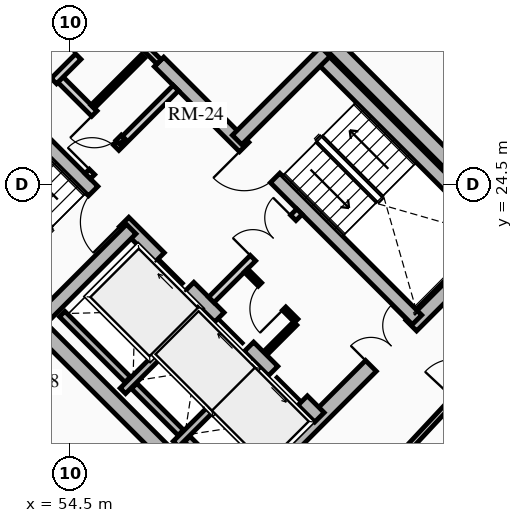
"""IFC4 building model, lengths in metres.
Left out: names, types, materials, properties, quantities, classifications, styles, units other than length and angle.
Written with IfcOpenShell. Run it as: python <this file> out.ifc"""

import sys

from ifc_helpers import new_model, si_unit, direction, frame, frame_2d, origin, place, context, subcontext, project, spatial, rectangle, extrude, source, transform, mapped, element, fill, save


model = new_model("IFC4")
c1 = context("Model", 3, precision=1e-05, world=origin(), true_north=direction((0.0, 1.0)))
c2 = subcontext(c1, "Body", "Model", "MODEL_VIEW")
j1 = project(units=[si_unit("LENGTHUNIT", "METRE"), si_unit("PLANEANGLEUNIT", "RADIAN")], contexts=[c1])
p1 = place(None, origin())
s1 = spatial("IfcSite", under=j1, at=p1, CompositionType="ELEMENT")
p2 = place(p1, origin())
s2 = spatial("IfcBuilding", under=s1, at=p2, CompositionType="ELEMENT")
p3 = place(p2, frame((0.0, 0.0, 171.97)))
s3 = spatial("IfcBuildingStorey", under=s2, at=p3, CompositionType="ELEMENT", Elevation=171.97)
for number, where, z_axis, x_axis in (
    (1, (58.702, 15.732, 0.0), (0.0, 0.0, 1.0), (-0.707, 0.707, 0.0)),
    (2, (66.268, 23.298, 0.0), (0.0, 0.0, 1.0), (-0.707, 0.707, 0.0)),
):
    element("IfcWall", number, at=place(p3, frame(where, z_axis=z_axis, x_axis=x_axis)), inside=s3, PredefinedType="SHEAR", context=c2, shape_type="SweptSolid", body=[
        extrude(rectangle(XDim=14.1, YDim=0.4, at=frame_2d((7.05, 0.0))), origin(), (0.0, 0.0, 1.0), 2.91),
    ])
p4 = place(p3, frame((58.561, 15.873, 0.0), z_axis=(0.0, 0.0, 1.0), x_axis=(0.707106781187, 0.707106781187, 0.0)))
e3 = element("IfcWall", 3, at=p4, inside=s3, PredefinedType="SHEAR", context=c2, shape_type="SweptSolid", body=[
    extrude(rectangle(XDim=10.7, YDim=0.4, at=frame_2d((5.35, 0.0))), origin(), (0.0, 0.0, 1.0), 2.91),
])
m1 = source(origin(), c2, "Body", "SweptSolid", [
    extrude(rectangle(XDim=1.5, YDim=2.02, at=frame_2d((0.75, 1.01))), frame((0.0, 0.21, 0.0), z_axis=(0.0, -1.0, 0.0), x_axis=(1.0, 0.0, 0.0)), (0.0, 0.0, 1.0), 0.42),
])
p5 = place(p4, frame((5.45, 0.0, 0.0)))
e4 = element("IfcOpeningElement", 4, at=p5, cuts=e3, PredefinedType="OPENING", context=c2, shape_type="MappedRepresentation", body=[
    mapped(m1, transform((0.0, 0.0, 0.0), x_axis=(1.0, 0.0, 0.0), y_axis=(0.0, 1.0, 0.0), z_axis=(0.0, 0.0, 1.0), scale=1.0)),
])
p6 = place(p3, frame((48.873, 25.561, 0.0), z_axis=(0.0, 0.0, 1.0), x_axis=(0.707106781187, 0.707106781187, 0.0)))
e5 = element("IfcWall", 5, at=p6, inside=s3, PredefinedType="SHEAR", context=c2, shape_type="SweptSolid", body=[
    extrude(rectangle(XDim=10.7, YDim=0.4, at=frame_2d((5.35, 0.0))), origin(), (0.0, 0.0, 1.0), 2.91),
])
p7 = place(p6, frame((4.6, 0.0, 0.0)))
e6 = element("IfcOpeningElement", 6, at=p7, cuts=e5, PredefinedType="OPENING", context=c2, shape_type="MappedRepresentation", body=[
    mapped(m1, transform((0.0, 0.0, 0.0), x_axis=(1.0, 0.0, 0.0), y_axis=(0.0, 1.0, 0.0), z_axis=(0.0, 0.0, 1.0), scale=1.0)),
])
p8 = place(p3, frame((61.06, 18.373, 0.0), z_axis=(0.0, 0.0, 1.0), x_axis=(-0.707106781187, 0.707106781187, 0.0)))
e7 = element("IfcWall", 7, at=p8, inside=s3, PredefinedType="SHEAR", context=c2, shape_type="SweptSolid", body=[
    extrude(rectangle(XDim=13.7, YDim=0.35, at=frame_2d((6.85, 0.0))), origin(), (0.0, 0.0, 1.0), 2.91),
])
m2 = source(origin(), c2, "Body", "SweptSolid", [
    extrude(rectangle(XDim=1.1, YDim=2.015, at=frame_2d((0.55, 1.007))), frame((0.0, 0.185, 0.0), z_axis=(0.0, -1.0, 0.0), x_axis=(1.0, 0.0, 0.0)), (0.0, 0.0, 1.0), 0.37),
])
p9 = place(p8, frame((4.85, 0.0, 0.0)))
e8 = element("IfcOpeningElement", 8, at=p9, cuts=e7, PredefinedType="OPENING", context=c2, shape_type="MappedRepresentation", body=[
    mapped(m2, transform((0.0, 0.0, 0.0), x_axis=(1.0, 0.0, 0.0), y_axis=(0.0, 1.0, 0.0), z_axis=(0.0, 0.0, 1.0), scale=1.0)),
])
p10 = place(p8, frame((0.625, 0.0, 0.0)))
e9 = element("IfcOpeningElement", 9, at=p10, cuts=e7, PredefinedType="OPENING", context=c2, shape_type="MappedRepresentation", body=[
    mapped(m2, transform((0.0, 0.0, 0.0), x_axis=(1.0, 0.0, 0.0), y_axis=(0.0, 1.0, 0.0), z_axis=(0.0, 0.0, 1.0), scale=1.0)),
])
p11 = place(p8, frame((2.625, 0.0, 0.0)))
e10 = element("IfcOpeningElement", 10, at=p11, cuts=e7, PredefinedType="OPENING", context=c2, shape_type="MappedRepresentation", body=[
    mapped(m2, transform((0.0, 0.0, 0.0), x_axis=(1.0, 0.0, 0.0), y_axis=(0.0, 1.0, 0.0), z_axis=(0.0, 0.0, 1.0), scale=1.0)),
])
m3 = source(origin(), c2, "Body", "SweptSolid", [
    extrude(rectangle(XDim=1.15, YDim=2.02, at=frame_2d((0.575, 1.01))), frame((0.0, 0.185, 0.0), z_axis=(0.0, -1.0, 0.0), x_axis=(1.0, 0.0, 0.0)), (0.0, 0.0, 1.0), 0.37),
])
p12 = place(p8, frame((7.27, 0.0, 0.0)))
e11 = element("IfcOpeningElement", 11, at=p12, cuts=e7, PredefinedType="OPENING", context=c2, shape_type="MappedRepresentation", body=[
    mapped(m3, transform((0.0, 0.0, 0.0), x_axis=(1.0, 0.0, 0.0), y_axis=(0.0, 1.0, 0.0), z_axis=(0.0, 0.0, 1.0), scale=1.0)),
])
p13 = place(p3, frame((63.627, 20.94, 0.0), z_axis=(0.0, 0.0, 1.0), x_axis=(-0.707119496762, 0.707094065383, 0.0)))
e12 = element("IfcWall", 12, at=p13, inside=s3, PredefinedType="SHEAR", context=c2, shape_type="SweptSolid", body=[
    extrude(rectangle(XDim=9.6, YDim=0.35, at=frame_2d((4.8, 0.0))), origin(), (0.0, 0.0, 1.0), 2.91),
])
p14 = place(p13, frame((5.28, 0.0, 0.0)))
e13 = element("IfcOpeningElement", 13, at=p14, cuts=e12, PredefinedType="OPENING", context=c2, shape_type="MappedRepresentation", body=[
    mapped(m3, transform((0.0, 0.0, 0.0), x_axis=(1.0, 0.0, 0.0), y_axis=(0.0, 1.0, 0.0), z_axis=(0.0, 0.0, 1.0), scale=1.0)),
])
p15 = place(p3, frame((53.922, 21.141, 0.0), z_axis=(0.0, 0.0, 1.0), x_axis=(-0.707106781187, 0.707106781187, 0.0)))
e14 = element("IfcWall", 14, at=p15, inside=s3, PredefinedType="SHEAR", context=c2, shape_type="SweptSolid", body=[
    extrude(rectangle(XDim=6.695, YDim=0.35, at=frame_2d((3.348, 0.0))), origin(), (0.0, 0.0, 1.0), 2.91),
])
p16 = place(p3, frame((53.784, 21.003, 0.0), z_axis=(0.0, 0.0, 1.0), x_axis=(0.707106781187, 0.707106781187, 0.0)))
e15 = element("IfcWall", 15, at=p16, inside=s3, PredefinedType="SHEAR", context=c2, shape_type="SweptSolid", body=[
    extrude(rectangle(XDim=3.285, YDim=0.35, at=frame_2d((1.643, 0.0))), origin(), (0.0, 0.0, 1.0), 2.91),
])
p17 = place(p3, frame((65.812, 23.125, 0.0), z_axis=(0.0, 0.0, 1.0), x_axis=(-0.707106781187, 0.707106781187, 0.0)))
e16 = element("IfcWall", 16, at=p17, inside=s3, PredefinedType="SHEAR", context=c2, shape_type="SweptSolid", body=[
    extrude(rectangle(XDim=6.695, YDim=0.35, at=frame_2d((3.348, 0.0))), origin(), (0.0, 0.0, 1.0), 2.91),
])
p18 = place(p3, frame((58.893, 25.674, 0.0), z_axis=(0.0, 0.0, 1.0), x_axis=(0.707106781187, 0.707106781187, 0.0)))
e17 = element("IfcWall", 17, at=p18, inside=s3, PredefinedType="SHEAR", context=c2, shape_type="SweptSolid", body=[
    extrude(rectangle(XDim=3.285, YDim=0.35, at=frame_2d((1.643, 0.0))), origin(), (0.0, 0.0, 1.0), 2.91),
])
p19 = place(p3, frame((55.888, 19.069, 0.0), z_axis=(0.0, 0.0, 1.0), x_axis=(0.707106781187, 0.707106781187, 0.0)))
e18 = element("IfcWall", 18, at=p19, inside=s3, PredefinedType="SHEAR", context=c2, shape_type="SweptSolid", body=[
    extrude(rectangle(XDim=2.97, YDim=0.2, at=frame_2d((1.485, 0.0))), origin(), (0.0, 0.0, 1.0), 2.91),
])
p20 = place(p3, frame((56.015, 19.366, 0.0), z_axis=(0.0, 0.0, 1.0), x_axis=(-0.707106781187, 0.707106781187, 0.0)))
e19 = element("IfcWall", 19, at=p20, inside=s3, PredefinedType="SHEAR", context=c2, shape_type="SweptSolid", body=[
    extrude(rectangle(XDim=2.44, YDim=0.2, at=frame_2d((1.22, 0.0))), origin(), (0.0, 0.0, 1.0), 2.91),
])
p21 = place(p3, frame((57.284, 17.673, 0.0), z_axis=(0.0, 0.0, 1.0), x_axis=(0.707147878904, 0.70706568108, 0.0)))
e20 = element("IfcWall", 20, at=p21, inside=s3, PredefinedType="SHEAR", context=c2, shape_type="SweptSolid", body=[
    extrude(rectangle(XDim=2.97, YDim=0.2, at=frame_2d((1.485, 0.0))), origin(), (0.0, 0.0, 1.0), 2.91),
])
p22 = place(p3, frame((57.412, 17.97, 0.0), z_axis=(0.0, 0.0, 1.0), x_axis=(-0.707106781187, 0.707106781187, 0.0)))
e21 = element("IfcWall", 21, at=p22, inside=s3, PredefinedType="SHEAR", context=c2, shape_type="SweptSolid", body=[
    extrude(rectangle(XDim=1.735, YDim=0.2, at=frame_2d((0.867, 0.0))), origin(), (0.0, 0.0, 1.0), 2.91),
])
p23 = place(p3, frame((58.737, 16.644, 0.0), z_axis=(0.0, 0.0, 1.0), x_axis=(-0.707032117043, 0.707181437447, 0.0)))
e22 = element("IfcWall", 22, at=p23, inside=s3, PredefinedType="SHEAR", context=c2, shape_type="SweptSolid", body=[
    extrude(rectangle(XDim=1.635, YDim=0.2, at=frame_2d((0.817, 0.0))), origin(), (0.0, 0.0, 1.0), 2.91),
])
p24 = place(p3, frame((58.214, 21.467, 0.0), z_axis=(0.0, 0.0, 1.0), x_axis=(0.707106781187, 0.707106781187, 0.0)))
e23 = element("IfcWall", 23, at=p24, inside=s3, PredefinedType="PARTITIONING", context=c2, shape_type="SweptSolid", body=[
    extrude(rectangle(XDim=3.28, YDim=0.2, at=frame_2d((1.64, 0.0))), origin(), (0.0, 0.0, 1.0), 2.675),
])
m4 = source(origin(), c2, "Body", "SweptSolid", [
    extrude(rectangle(XDim=1.5, YDim=2.02, at=frame_2d((0.75, 1.01))), frame((0.0, 0.11, 0.0), z_axis=(0.0, -1.0, 0.0), x_axis=(1.0, 0.0, 0.0)), (0.0, 0.0, 1.0), 0.22),
])
p25 = place(p24, frame((1.55, 0.0, 0.0)))
e24 = element("IfcOpeningElement", 24, at=p25, cuts=e23, PredefinedType="OPENING", context=c2, shape_type="MappedRepresentation", body=[
    mapped(m4, transform((0.0, 0.0, 0.0), x_axis=(1.0, 0.0, 0.0), y_axis=(0.0, 1.0, 0.0), z_axis=(0.0, 0.0, 1.0), scale=1.0)),
])
p26 = place(p3, frame((54.961, 24.719, 0.0), z_axis=(0.0, 0.0, 1.0), x_axis=(0.707106781187, 0.707106781187, 0.0)))
e25 = element("IfcWall", 25, at=p26, inside=s3, PredefinedType="PARTITIONING", context=c2, shape_type="SweptSolid", body=[
    extrude(rectangle(XDim=3.28, YDim=0.2, at=frame_2d((1.64, 0.0))), origin(), (0.0, 0.0, 1.0), 2.675),
])
m5 = source(origin(), c2, "Body", "SweptSolid", [
    extrude(rectangle(XDim=0.9, YDim=2.005, at=frame_2d((0.45, 1.002))), frame((0.0, 0.11, 0.0), z_axis=(0.0, -1.0, 0.0), x_axis=(1.0, 0.0, 0.0)), (0.0, 0.0, 1.0), 0.22),
])
p27 = place(p26, frame((0.16, 0.0, 0.0)))
e26 = element("IfcOpeningElement", 26, at=p27, cuts=e25, PredefinedType="OPENING", context=c2, shape_type="MappedRepresentation", body=[
    mapped(m5, transform((0.0, 0.0, 0.0), x_axis=(1.0, 0.0, 0.0), y_axis=(0.0, 1.0, 0.0), z_axis=(0.0, 0.0, 1.0), scale=1.0)),
])
p28 = place(p3, frame((55.874, 25.631, 0.0), z_axis=(0.0, 0.0, 1.0), x_axis=(-0.707157639372, 0.707055919343, 0.0)))
e27 = element("IfcWall", 27, at=p28, inside=s3, PredefinedType="PARTITIONING", context=c2, shape_type="SweptSolid", body=[
    extrude(rectangle(XDim=2.4, YDim=0.2, at=frame_2d((1.2, 0.0))), origin(), (0.0, 0.0, 1.0), 2.675),
])
p29 = place(p28, frame((0.14, 0.0, 0.0)))
e28 = element("IfcOpeningElement", 28, at=p29, cuts=e27, PredefinedType="OPENING", context=c2, shape_type="MappedRepresentation", body=[
    mapped(m5, transform((0.0, 0.0, 0.0), x_axis=(1.0, 0.0, 0.0), y_axis=(0.0, 1.0, 0.0), z_axis=(0.0, 0.0, 1.0), scale=1.0)),
])
p30 = place(p3, frame((53.264, 26.416, 0.0), z_axis=(0.0, 0.0, 1.0), x_axis=(0.707106781187, 0.707106781187, 0.0)))
e29 = element("IfcWall", 29, at=p30, inside=s3, PredefinedType="PARTITIONING", context=c2, shape_type="SweptSolid", body=[
    extrude(rectangle(XDim=3.28, YDim=0.2, at=frame_2d((1.64, 0.0))), origin(), (0.0, 0.0, 1.0), 2.675),
])
m6 = source(origin(), c2, "Body", "SweptSolid", [
    extrude(rectangle(XDim=1.0, YDim=2.015, at=frame_2d((0.5, 1.007))), frame((0.0, 0.11, 0.0), z_axis=(0.0, -1.0, 0.0), x_axis=(1.0, 0.0, 0.0)), (0.0, 0.0, 1.0), 0.22),
])
p31 = place(p30, frame((0.14, 0.0, 0.0)))
e30 = element("IfcOpeningElement", 30, at=p31, cuts=e29, PredefinedType="OPENING", context=c2, shape_type="MappedRepresentation", body=[
    mapped(m6, transform((0.0, 0.0, 0.0), x_axis=(1.0, 0.0, 0.0), y_axis=(0.0, 1.0, 0.0), z_axis=(0.0, 0.0, 1.0), scale=1.0)),
])
p32 = place(p30, frame((2.05, 0.0, 0.0)))
e31 = element("IfcOpeningElement", 31, at=p32, cuts=e29, PredefinedType="OPENING", context=c2, shape_type="MappedRepresentation", body=[
    mapped(m5, transform((0.0, 0.0, 0.0), x_axis=(1.0, 0.0, 0.0), y_axis=(0.0, 1.0, 0.0), z_axis=(0.0, 0.0, 1.0), scale=1.0)),
])
p33 = place(p3, frame((60.448, 20.915, 0.0), z_axis=(0.0, 0.0, 1.0), x_axis=(-0.707106781187, 0.707106781187, 0.0)))
e32 = element("IfcWall", 32, at=p33, inside=s3, PredefinedType="PARTITIONING", context=c2, shape_type="SweptSolid", body=[
    extrude(rectangle(XDim=1.87, YDim=0.125, at=frame_2d((0.935, 0.0))), origin(), (0.0, 0.0, 1.0), 2.675),
])
m7 = source(origin(), c2, "Body", "SweptSolid", [
    extrude(rectangle(XDim=0.9, YDim=2.005, at=frame_2d((0.45, 1.002))), frame((0.0, 0.073, 0.0), z_axis=(0.0, -1.0, 0.0), x_axis=(1.0, 0.0, 0.0)), (0.0, 0.0, 1.0), 0.145),
])
p34 = place(p33, frame((0.45, 0.0, 0.0)))
e33 = element("IfcOpeningElement", 33, at=p34, cuts=e32, PredefinedType="OPENING", context=c2, shape_type="MappedRepresentation", body=[
    mapped(m7, transform((0.0, 0.0, 0.0), x_axis=(1.0, 0.0, 0.0), y_axis=(0.0, 1.0, 0.0), z_axis=(0.0, 0.0, 1.0), scale=1.0)),
])
p35 = place(p3, frame((59.643, 20.066, 0.0), z_axis=(0.0, 0.0, 1.0), x_axis=(0.707106781187, 0.707106781187, 0.0)))
e34 = element("IfcWall", 34, at=p35, inside=s3, PredefinedType="PARTITIONING", context=c2, shape_type="SweptSolid", body=[
    extrude(rectangle(XDim=1.1, YDim=0.125, at=frame_2d((0.55, 0.0))), origin(), (0.0, 0.0, 1.0), 2.675),
])
p36 = place(p3, frame((55.089, 26.543, 0.0), z_axis=(0.0, 0.0, 1.0), x_axis=(0.707106781187, 0.707106781187, 0.0)))
e35 = element("IfcWall", 35, at=p36, inside=s3, PredefinedType="PARTITIONING", context=c2, shape_type="SweptSolid", body=[
    extrude(rectangle(XDim=1.88, YDim=0.125, at=frame_2d((0.94, 0.0))), origin(), (0.0, 0.0, 1.0), 2.675),
])
p37 = place(p3, frame((56.839, 27.728, 0.0), z_axis=(0.0, 0.0, 1.0), x_axis=(-0.707106781187, 0.707106781187, 0.0)))
e36 = element("IfcWall", 36, at=p37, inside=s3, PredefinedType="PARTITIONING", context=c2, shape_type="SweptSolid", body=[
    extrude(rectangle(XDim=3.9, YDim=0.16, at=frame_2d((1.95, 0.0))), origin(), (0.0, 0.0, 1.0), 2.675),
])
m8 = source(origin(), c2, "Body", "SweptSolid", [
    extrude(rectangle(XDim=0.9, YDim=2.005, at=frame_2d((0.45, 1.002))), frame((0.0, 0.09, 0.0), z_axis=(0.0, -1.0, 0.0), x_axis=(1.0, 0.0, 0.0)), (0.0, 0.0, 1.0), 0.18),
])
p38 = place(p37, frame((2.2, 0.0, 0.0)))
e37 = element("IfcOpeningElement", 37, at=p38, cuts=e36, PredefinedType="OPENING", context=c2, shape_type="MappedRepresentation", body=[
    mapped(m8, transform((0.0, 0.0, 0.0), x_axis=(1.0, 0.0, 0.0), y_axis=(0.0, 1.0, 0.0), z_axis=(0.0, 0.0, 1.0), scale=1.0)),
])
p39 = place(p3, frame((52.055, 19.055, 0.0), z_axis=(0.0, 0.0, 1.0), x_axis=(0.699249850691, -0.714877364524, 0.0)))
e38 = element("IfcWall", 38, at=p39, inside=s3, PredefinedType="PARTITIONING", context=c2, shape_type="SweptSolid", body=[
    extrude(rectangle(XDim=5.999, YDim=0.15, at=frame_2d((3.0, 0.0))), origin(), (0.0, 0.0, 1.0), 2.245),
])
p40 = place(p3, frame((62.756, 16.873, 0.0), z_axis=(0.0, 0.0, 1.0), x_axis=(0.682136885079, 0.73122450042, 0.0)))
e39 = element("IfcWall", 39, at=p40, inside=s3, PredefinedType="PARTITIONING", context=c2, shape_type="SweptSolid", body=[
    extrude(rectangle(XDim=6.476, YDim=0.15, at=frame_2d((3.238, 0.0))), origin(), (0.0, 0.0, 1.0), 2.245),
])
m9 = source(origin(), c2, "Body", "SweptSolid", [
    extrude(rectangle(XDim=1.05, YDim=2.015, at=frame_2d((0.525, 1.007))), frame((0.0, 0.085, 0.0), z_axis=(0.0, -1.0, 0.0), x_axis=(1.0, 0.0, 0.0)), (0.0, 0.0, 1.0), 0.17),
])
p41 = place(p40, frame((2.713, 0.0, 0.0)))
e40 = element("IfcOpeningElement", 40, at=p41, cuts=e39, PredefinedType="OPENING", context=c2, shape_type="MappedRepresentation", body=[
    mapped(m9, transform((0.0, 0.0, 0.0), x_axis=(1.0, 0.0, 0.0), y_axis=(0.0, 1.0, 0.0), z_axis=(0.0, 0.0, 1.0), scale=1.0)),
])
p42 = place(p3, frame((50.905, 17.905, 0.0), z_axis=(0.0, 0.0, 1.0), x_axis=(0.723816902075, -0.689992095803, 0.0)))
e41 = element("IfcWall", 41, at=p42, inside=s3, PredefinedType="PARTITIONING", context=c2, shape_type="SweptSolid", body=[
    extrude(rectangle(XDim=5.753, YDim=0.125, at=frame_2d((2.876, 0.0))), origin(), (0.0, 0.0, 1.0), 2.245),
])
p43 = place(p42, frame((2.426, 0.0, 0.0)))
e42 = element("IfcOpeningElement", 42, at=p43, cuts=e41, PredefinedType="OPENING", context=c2, shape_type="MappedRepresentation", body=[
    mapped(m7, transform((0.0, 0.0, 0.0), x_axis=(1.0, 0.0, 0.0), y_axis=(0.0, 1.0, 0.0), z_axis=(0.0, 0.0, 1.0), scale=1.0)),
])
m10 = source(origin(), c2, "Body", "SweptSolid", [
    extrude(rectangle(XDim=1.1, YDim=2.015, at=frame_2d((0.55, 1.007))), frame((0.0, 0.025, 0.0), z_axis=(0.0, -1.0, 0.0), x_axis=(1.0, 0.0, 0.0)), (0.0, 0.0, 1.0), 0.05),
])
p44 = place(p9, origin())
e43 = element("IfcDoor", 43, at=p44, inside=s3, OperationType="SLIDING_TO_RIGHT", PredefinedType="DOOR", context=c2, shape_type="MappedRepresentation", body=[
    mapped(m10, transform((0.0, 0.0, 0.0), x_axis=(1.0, 0.0, 0.0), y_axis=(0.0, 1.0, 0.0), z_axis=(0.0, 0.0, 1.0), scale=1.0)),
])
fill(e8, e43)
p45 = place(p10, origin())
e44 = element("IfcDoor", 44, at=p45, inside=s3, OperationType="SLIDING_TO_LEFT", PredefinedType="DOOR", context=c2, shape_type="MappedRepresentation", body=[
    mapped(m10, transform((0.0, 0.0, 0.0), x_axis=(1.0, 0.0, 0.0), y_axis=(0.0, 1.0, 0.0), z_axis=(0.0, 0.0, 1.0), scale=1.0)),
])
fill(e9, e44)
p46 = place(p11, origin())
e45 = element("IfcDoor", 45, at=p46, inside=s3, OperationType="SLIDING_TO_RIGHT", PredefinedType="DOOR", context=c2, shape_type="MappedRepresentation", body=[
    mapped(m10, transform((0.0, 0.0, 0.0), x_axis=(1.0, 0.0, 0.0), y_axis=(0.0, 1.0, 0.0), z_axis=(0.0, 0.0, 1.0), scale=1.0)),
])
fill(e10, e45)
m11 = source(origin(), c2, "Body", "SweptSolid", [
    extrude(rectangle(XDim=1.15, YDim=2.02, at=frame_2d((0.575, 1.01))), frame((0.0, 0.025, 0.0), z_axis=(0.0, -1.0, 0.0), x_axis=(1.0, 0.0, 0.0)), (0.0, 0.0, 1.0), 0.05),
])
p47 = place(p12, origin())
e46 = element("IfcDoor", 46, at=p47, inside=s3, OperationType="SINGLE_SWING_LEFT", PredefinedType="DOOR", context=c2, shape_type="MappedRepresentation", body=[
    mapped(m11, transform((0.0, 0.0, 0.0), x_axis=(1.0, 0.0, 0.0), y_axis=(0.0, 1.0, 0.0), z_axis=(0.0, 0.0, 1.0), scale=1.0)),
])
fill(e11, e46)
p48 = place(p14, origin())
e47 = element("IfcDoor", 47, at=p48, inside=s3, OperationType="SINGLE_SWING_RIGHT", PredefinedType="DOOR", context=c2, shape_type="MappedRepresentation", body=[
    mapped(m11, transform((0.0, 0.0, 0.0), x_axis=(1.0, 0.0, 0.0), y_axis=(0.0, 1.0, 0.0), z_axis=(0.0, 0.0, 1.0), scale=1.0)),
])
fill(e13, e47)
m12 = source(origin(), c2, "Body", "SweptSolid", [
    extrude(rectangle(XDim=1.5, YDim=2.02, at=frame_2d((0.75, 1.01))), frame((0.0, 0.025, 0.0), z_axis=(0.0, -1.0, 0.0), x_axis=(1.0, 0.0, 0.0)), (0.0, 0.0, 1.0), 0.05),
])
p49 = place(p5, origin())
e48 = element("IfcDoor", 48, at=p49, inside=s3, OperationType="DOUBLE_DOOR_SINGLE_SWING", PredefinedType="DOOR", context=c2, shape_type="MappedRepresentation", body=[
    mapped(m12, transform((0.0, 0.0, 0.0), x_axis=(1.0, 0.0, 0.0), y_axis=(0.0, 1.0, 0.0), z_axis=(0.0, 0.0, 1.0), scale=1.0)),
])
fill(e4, e48)
p50 = place(p25, origin())
e49 = element("IfcDoor", 49, at=p50, inside=s3, OperationType="DOUBLE_DOOR_SINGLE_SWING", PredefinedType="DOOR", context=c2, shape_type="MappedRepresentation", body=[
    mapped(m12, transform((0.0, 0.0, 0.0), x_axis=(1.0, 0.0, 0.0), y_axis=(0.0, 1.0, 0.0), z_axis=(0.0, 0.0, 1.0), scale=1.0)),
])
fill(e24, e49)
m13 = source(origin(), c2, "Body", "SweptSolid", [
    extrude(rectangle(XDim=0.9, YDim=2.005, at=frame_2d((0.45, 1.002))), frame((0.0, 0.025, 0.0), z_axis=(0.0, -1.0, 0.0), x_axis=(1.0, 0.0, 0.0)), (0.0, 0.0, 1.0), 0.05),
])
p51 = place(p27, origin())
e50 = element("IfcDoor", 50, at=p51, inside=s3, OperationType="SINGLE_SWING_LEFT", PredefinedType="DOOR", context=c2, shape_type="MappedRepresentation", body=[
    mapped(m13, transform((0.0, 0.0, 0.0), x_axis=(1.0, 0.0, 0.0), y_axis=(0.0, 1.0, 0.0), z_axis=(0.0, 0.0, 1.0), scale=1.0)),
])
fill(e26, e50)
m14 = source(origin(), c2, "Body", "SweptSolid", [
    extrude(rectangle(XDim=1.0, YDim=2.015, at=frame_2d((0.5, 1.007))), frame((0.0, 0.025, 0.0), z_axis=(0.0, -1.0, 0.0), x_axis=(1.0, 0.0, 0.0)), (0.0, 0.0, 1.0), 0.05),
])
p52 = place(p31, origin())
e51 = element("IfcDoor", 51, at=p52, inside=s3, OperationType="SINGLE_SWING_RIGHT", PredefinedType="DOOR", context=c2, shape_type="MappedRepresentation", body=[
    mapped(m14, transform((0.0, 0.0, 0.0), x_axis=(1.0, 0.0, 0.0), y_axis=(0.0, 1.0, 0.0), z_axis=(0.0, 0.0, 1.0), scale=1.0)),
])
fill(e30, e51)
p53 = place(p34, origin())
e52 = element("IfcDoor", 52, at=p53, inside=s3, OperationType="SINGLE_SWING_LEFT", PredefinedType="DOOR", context=c2, shape_type="MappedRepresentation", body=[
    mapped(m13, transform((0.0, 0.0, 0.0), x_axis=(1.0, 0.0, 0.0), y_axis=(0.0, 1.0, 0.0), z_axis=(0.0, 0.0, 1.0), scale=1.0)),
])
fill(e33, e52)
p54 = place(p29, origin())
e53 = element("IfcDoor", 53, at=p54, inside=s3, OperationType="SINGLE_SWING_RIGHT", PredefinedType="DOOR", context=c2, shape_type="MappedRepresentation", body=[
    mapped(m13, transform((0.0, 0.0, 0.0), x_axis=(1.0, 0.0, 0.0), y_axis=(0.0, 1.0, 0.0), z_axis=(0.0, 0.0, 1.0), scale=1.0)),
])
fill(e28, e53)
p55 = place(p32, origin())
e54 = element("IfcDoor", 54, at=p55, inside=s3, OperationType="SINGLE_SWING_LEFT", PredefinedType="DOOR", context=c2, shape_type="MappedRepresentation", body=[
    mapped(m13, transform((0.0, 0.0, 0.0), x_axis=(1.0, 0.0, 0.0), y_axis=(0.0, 1.0, 0.0), z_axis=(0.0, 0.0, 1.0), scale=1.0)),
])
fill(e31, e54)
save(model, sys.argv[1])
